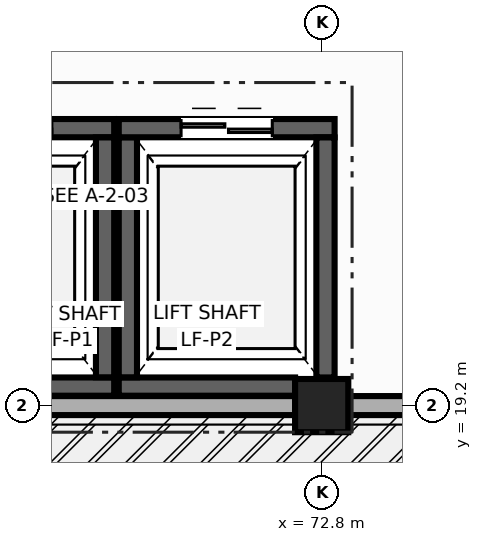
"""IFC4 building model, lengths in metres.
Left out: names, types, materials, properties, quantities, classifications, styles, units other than length and angle.
Written with IfcOpenShell. Run it as: python <this file> out.ifc"""

import sys

from ifc_helpers import new_model, si_unit, direction, frame, frame_2d, origin, origin_2d, place, context, subcontext, project, spatial, rectangle, extrude, element, fill, save


model = new_model("IFC4")
c1 = context("Model", 3, precision=1e-05, world=origin(), true_north=direction((0.0, 1.0)))
c2 = subcontext(c1, "Body", "Model", "MODEL_VIEW")
j1 = project(units=[si_unit("LENGTHUNIT", "METRE"), si_unit("PLANEANGLEUNIT", "RADIAN")], contexts=[c1])
p1 = place(None, origin())
s1 = spatial("IfcSite", under=j1, at=p1, CompositionType="ELEMENT")
p2 = place(p1, origin())
s2 = spatial("IfcBuilding", under=s1, at=p2, CompositionType="ELEMENT")
p3 = place(p2, origin())
s3 = spatial("IfcBuildingStorey", under=s2, at=p3, CompositionType="ELEMENT", Elevation=0.0)
p4 = place(p3, frame((72.8, 19.2, 0.0), z_axis=(0.0, 0.0, 1.0), x_axis=(1.0, 0.0, 0.0)))
e1 = element("IfcColumn", 1, at=p4, inside=s3, PredefinedType="COLUMN", context=c2, shape_type="SweptSolid", body=[
    extrude(rectangle(XDim=0.7, YDim=0.7, at=origin_2d()), origin(), (0.0, 0.0, 1.0), 5.4),
])
p5 = place(p3, frame((79.65, 19.2, 0.0), z_axis=(0.0, 0.0, 1.0), x_axis=(-1.0, 0.0, 0.0)))
e2 = element("IfcWall", 2, at=p5, inside=s3, PredefinedType="SOLIDWALL", context=c2, shape_type="SweptSolid", body=[
    extrude(rectangle(XDim=6.5, YDim=0.25, at=frame_2d((3.25, 0.0))), origin(), (0.0, 0.0, 1.0), 4.395),
])
p6 = place(p5, frame((2.05, 0.0, 0.0)))
e3 = element("IfcOpeningElement", 3, at=p6, cuts=e2, PredefinedType="OPENING", context=c2, shape_type="SweptSolid", body=[
    extrude(rectangle(XDim=2.4, YDim=2.7, at=frame_2d((1.2, 1.35))), frame((0.0, 0.135, 0.0), z_axis=(0.0, -1.0, 0.0), x_axis=(1.0, 0.0, 0.0)), (0.0, 0.0, 1.0), 0.27),
])
p7 = place(p3, frame((72.45, 19.2, 0.0), z_axis=(0.0, 0.0, 1.0), x_axis=(-1.0, 0.0, 0.0)))
e4 = element("IfcWall", 4, at=p7, inside=s3, PredefinedType="SOLIDWALL", context=c2, shape_type="SweptSolid", body=[
    extrude(rectangle(XDim=5.3, YDim=0.25, at=frame_2d((2.65, 0.0))), origin(), (0.0, 0.0, 1.0), 4.645),
])
p8 = place(p3, frame((70.07, 19.45, 0.0), z_axis=(0.0, 0.0, 1.0), x_axis=(-1.0, 0.0, 0.0)))
e5 = element("IfcWall", 5, at=p8, inside=s3, PredefinedType="SHEAR", context=c2, shape_type="SweptSolid", body=[
    extrude(rectangle(XDim=2.84, YDim=0.24, at=frame_2d((1.42, 0.0))), origin(), (0.0, 0.0, 1.0), 5.1),
])
p9 = place(p3, frame((67.23, 22.85, 0.0), z_axis=(0.0, 0.0, 1.0), x_axis=(1.0, 0.0, 0.0)))
e6 = element("IfcWall", 6, at=p9, inside=s3, PredefinedType="SHEAR", context=c2, shape_type="SweptSolid", body=[
    extrude(rectangle(XDim=2.84, YDim=0.24, at=frame_2d((1.42, 0.0))), origin(), (0.0, 0.0, 1.0), 5.1),
])
p10 = place(p9, frame((0.82, 0.0, 0.0)))
e7 = element("IfcOpeningElement", 7, at=p10, cuts=e6, PredefinedType="OPENING", context=c2, shape_type="SweptSolid", body=[
    extrude(rectangle(XDim=1.2, YDim=2.15, at=frame_2d((0.6, 1.075))), frame((0.0, 0.13, 0.0), z_axis=(0.0, -1.0, 0.0), x_axis=(1.0, 0.0, 0.0)), (0.0, 0.0, 1.0), 0.26),
])
p11 = place(p3, frame((69.95, 22.728, 0.0), z_axis=(0.0, 0.0, 1.0), x_axis=(0.0, -1.0, 0.0)))
e8 = element("IfcWall", 8, at=p11, inside=s3, PredefinedType="SHEAR", context=c2, shape_type="SweptSolid", body=[
    extrude(rectangle(XDim=3.156, YDim=0.24, at=frame_2d((1.578, 0.0))), origin(), (0.0, 0.0, 1.0), 5.1),
])
p12 = place(p3, frame((72.45, 19.45, 0.0), z_axis=(0.0, 0.0, 1.0), x_axis=(-1.0, 0.0, 0.0)))
e9 = element("IfcWall", 9, at=p12, inside=s3, PredefinedType="SHEAR", context=c2, shape_type="SweptSolid", body=[
    extrude(rectangle(XDim=2.32, YDim=0.24, at=frame_2d((1.16, 0.0))), origin(), (0.0, 0.0, 1.0), 5.1),
])
p13 = place(p3, frame((70.25, 19.572, 0.0), z_axis=(0.0, 0.0, 1.0), x_axis=(0.0, 1.0, 0.0)))
e10 = element("IfcWall", 10, at=p13, inside=s3, PredefinedType="SHEAR", context=c2, shape_type="SweptSolid", body=[
    extrude(rectangle(XDim=3.158, YDim=0.24, at=frame_2d((1.579, 0.0))), origin(), (0.0, 0.0, 1.0), 5.1),
])
p14 = place(p3, frame((70.13, 22.85, 0.0), z_axis=(0.0, 0.0, 1.0), x_axis=(1.0, 0.0, 0.0)))
e11 = element("IfcWall", 11, at=p14, inside=s3, PredefinedType="SHEAR", context=c2, shape_type="SweptSolid", body=[
    extrude(rectangle(XDim=2.84, YDim=0.24, at=frame_2d((1.42, 0.0))), origin(), (0.0, 0.0, 1.0), 5.1),
])
p15 = place(p14, frame((0.82, 0.0, 0.0)))
e12 = element("IfcOpeningElement", 12, at=p15, cuts=e11, PredefinedType="OPENING", context=c2, shape_type="SweptSolid", body=[
    extrude(rectangle(XDim=1.2, YDim=2.15, at=frame_2d((0.6, 1.075))), frame((0.0, 0.13, 0.0), z_axis=(0.0, -1.0, 0.0), x_axis=(1.0, 0.0, 0.0)), (0.0, 0.0, 1.0), 0.26),
])
p16 = place(p3, frame((72.85, 22.728, 0.0), z_axis=(0.0, 0.0, 1.0), x_axis=(0.0, -1.0, 0.0)))
e13 = element("IfcWall", 13, at=p16, inside=s3, PredefinedType="SHEAR", context=c2, shape_type="SweptSolid", body=[
    extrude(rectangle(XDim=3.158, YDim=0.24, at=frame_2d((1.579, 0.0))), origin(), (0.0, 0.0, 1.0), 5.1),
])
p17 = place(p10, origin())
e14 = element("IfcDoor", 14, at=p17, inside=s3, OperationType="DOUBLE_DOOR_SLIDING", PredefinedType="DOOR", context=c2, shape_type="SweptSolid", body=[
    extrude(rectangle(XDim=1.2, YDim=2.15, at=frame_2d((0.6, 1.075))), frame((0.0, 0.025, 0.0), z_axis=(0.0, -1.0, 0.0), x_axis=(1.0, 0.0, 0.0)), (0.0, 0.0, 1.0), 0.05),
])
fill(e7, e14)
p18 = place(p15, origin())
e15 = element("IfcDoor", 15, at=p18, inside=s3, OperationType="DOUBLE_DOOR_SLIDING", PredefinedType="DOOR", context=c2, shape_type="SweptSolid", body=[
    extrude(rectangle(XDim=1.2, YDim=2.15, at=frame_2d((0.6, 1.075))), frame((0.0, 0.025, 0.0), z_axis=(0.0, -1.0, 0.0), x_axis=(1.0, 0.0, 0.0)), (0.0, 0.0, 1.0), 0.05),
])
fill(e12, e15)
save(model, sys.argv[1])
